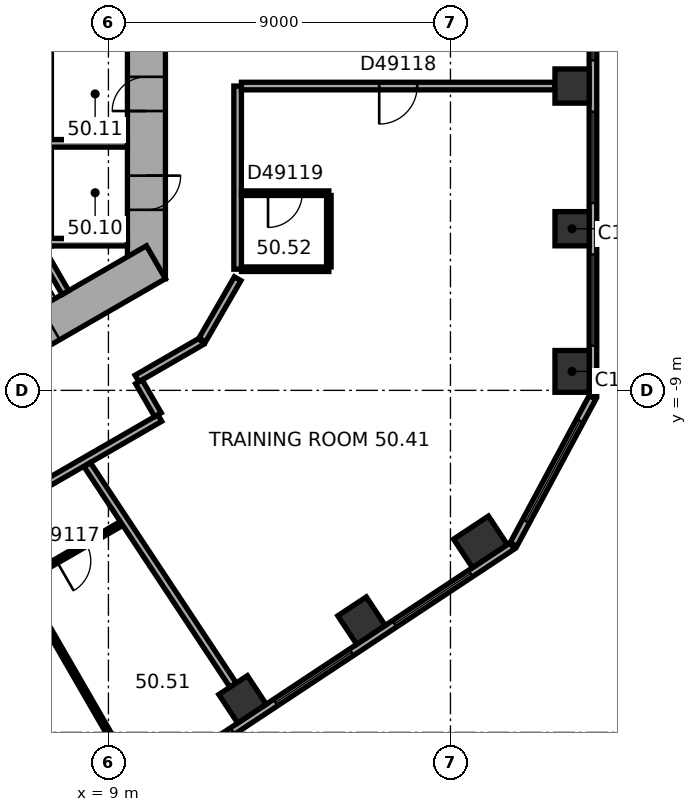
"""IFC4 building model, lengths in metres.
Left out: names, types, materials, properties, quantities, classifications, styles, units other than length and angle.
Written with IfcOpenShell. Run it as: python <this file> out.ifc"""

import sys

from ifc_helpers import new_model, si_unit, direction, frame, frame_2d, origin, origin_2d, place, context, subcontext, project, spatial, rectangle, extrude, element, fill, save


model = new_model("IFC4")
c1 = context("Model", 3, precision=1e-05, world=origin(), true_north=direction((0.0, 1.0)))
c2 = subcontext(c1, "Body", "Model", "MODEL_VIEW")
j1 = project(units=[si_unit("LENGTHUNIT", "METRE"), si_unit("PLANEANGLEUNIT", "RADIAN")], contexts=[c1])
p1 = place(None, origin())
s1 = spatial("IfcSite", under=j1, at=p1, CompositionType="ELEMENT")
p2 = place(p1, origin())
s2 = spatial("IfcBuilding", under=s1, at=p2, CompositionType="ELEMENT")
p3 = place(p2, frame((0.0, 0.0, 202.1)))
s3 = spatial("IfcBuildingStorey", under=s2, at=p3, CompositionType="ELEMENT", Elevation=202.1)
p4 = place(p3, frame((21.2, -8.501, 0.0), z_axis=(0.0, 0.0, 1.0), x_axis=(0.0, 1.0, 0.0)))
e1 = element("IfcColumn", 1, at=p4, inside=s3, PredefinedType="COLUMN", context=c2, shape_type="SweptSolid", body=[
    extrude(rectangle(XDim=1.1, YDim=0.9, at=origin_2d()), origin(), (0.0, 0.0, 1.0), 3.7),
])
for number, where, z_axis, x_axis in (
    (2, (21.2, -4.747, 0.0), (0.0, 0.0, 1.0), (0.0, 1.0, 0.0)),
    (3, (21.2, -0.993, 0.0), (0.0, 0.0, 1.0), (0.0, 1.0, 0.0)),
    (4, (12.529, -17.13, 0.0), (0.0, 0.0, 1.0), (0.834, 0.552, 0.0)),
    (5, (15.659, -15.058, 0.0), (0.0, 0.0, 1.0), (0.834, 0.552, 0.0)),
):
    element("IfcColumn", number, at=place(p3, frame(where, z_axis=z_axis, x_axis=x_axis)), inside=s3, PredefinedType="COLUMN", context=c2, shape_type="SweptSolid", body=[
        extrude(rectangle(XDim=0.9, YDim=0.9, at=origin_2d()), origin(), (0.0, 0.0, 1.0), 3.7),
    ])
p5 = place(p3, frame((18.79, -12.986, 0.0), z_axis=(0.0, 0.0, 1.0), x_axis=(0.833885822067, 0.551936985312, 0.0)))
e6 = element("IfcColumn", 6, at=p5, inside=s3, PredefinedType="COLUMN", context=c2, shape_type="SweptSolid", body=[
    extrude(rectangle(XDim=1.1, YDim=0.9, at=origin_2d()), origin(), (0.0, 0.0, 1.0), 3.7),
])
p6 = place(p3, frame((10.0, -6.062, 0.0), z_axis=(0.0, 0.0, 1.0), x_axis=(0.0, 1.0, 0.0)))
e7 = element("IfcWall", 7, at=p6, inside=s3, PredefinedType="SHEAR", context=c2, shape_type="SweptSolid", body=[
    extrude(rectangle(XDim=12.125, YDim=1.0, at=frame_2d((6.062, 0.0))), origin(), (0.0, 0.0, 1.0), 3.7),
])
p7 = place(p6, frame((6.262, 0.0, 0.0)))
e8 = element("IfcOpeningElement", 8, at=p7, cuts=e7, PredefinedType="OPENING", context=c2, shape_type="SweptSolid", body=[
    extrude(rectangle(XDim=1.5, YDim=2.1, at=frame_2d((0.75, 1.05))), frame((0.0, 0.51, 0.0), z_axis=(0.0, -1.0, 0.0), x_axis=(1.0, 0.0, 0.0)), (0.0, 0.0, 1.0), 1.02),
])
p8 = place(p6, frame((1.812, 0.0, 0.0)))
e9 = element("IfcOpeningElement", 9, at=p8, cuts=e7, PredefinedType="OPENING", context=c2, shape_type="SweptSolid", body=[
    extrude(rectangle(XDim=0.9, YDim=2.1, at=frame_2d((0.45, 1.05))), frame((0.0, 0.51, 0.0), z_axis=(0.0, -1.0, 0.0), x_axis=(1.0, 0.0, 0.0)), (0.0, 0.0, 1.0), 1.02),
])
p9 = place(p6, frame((4.412, 0.0, 0.0)))
e10 = element("IfcOpeningElement", 10, at=p9, cuts=e7, PredefinedType="OPENING", context=c2, shape_type="SweptSolid", body=[
    extrude(rectangle(XDim=0.9, YDim=2.1, at=frame_2d((0.45, 1.05))), frame((0.0, 0.51, 0.0), z_axis=(0.0, -1.0, 0.0), x_axis=(1.0, 0.0, 0.0)), (0.0, 0.0, 1.0), 1.02),
])
p10 = place(p3, frame((-0.25, -11.691, 0.0), z_axis=(0.0, 0.0, 1.0), x_axis=(0.866022616891, 0.50000482701, 0.0)))
e11 = element("IfcWall", 11, at=p10, inside=s3, PredefinedType="SHEAR", context=c2, shape_type="SweptSolid", body=[
    extrude(rectangle(XDim=12.125, YDim=1.0, at=frame_2d((6.062, 0.0))), origin(), (0.0, 0.0, 1.0), 3.7),
])
p11 = place(p10, frame((2.612, 0.0, 0.0)))
e12 = element("IfcOpeningElement", 12, at=p11, cuts=e11, PredefinedType="OPENING", context=c2, shape_type="SweptSolid", body=[
    extrude(rectangle(XDim=1.1, YDim=2.1, at=frame_2d((0.55, 1.05))), frame((0.0, 0.51, 0.0), z_axis=(0.0, -1.0, 0.0), x_axis=(1.0, 0.0, 0.0)), (0.0, 0.0, 1.0), 1.02),
])
p12 = place(p10, frame((5.212, 0.0, 0.0)))
e13 = element("IfcOpeningElement", 13, at=p12, cuts=e11, PredefinedType="OPENING", context=c2, shape_type="SweptSolid", body=[
    extrude(rectangle(XDim=1.1, YDim=2.1, at=frame_2d((0.55, 1.05))), frame((0.0, 0.51, 0.0), z_axis=(0.0, -1.0, 0.0), x_axis=(1.0, 0.0, 0.0)), (0.0, 0.0, 1.0), 1.02),
])
p13 = place(p10, frame((7.812, 0.0, 0.0)))
e14 = element("IfcOpeningElement", 14, at=p13, cuts=e11, PredefinedType="OPENING", context=c2, shape_type="SweptSolid", body=[
    extrude(rectangle(XDim=1.1, YDim=2.1, at=frame_2d((0.55, 1.05))), frame((0.0, 0.51, 0.0), z_axis=(0.0, -1.0, 0.0), x_axis=(1.0, 0.0, 0.0)), (0.0, 0.0, 1.0), 1.02),
])
p14 = place(p3, frame((21.75, -9.138, 0.0), z_axis=(0.0, 0.0, 1.0), x_axis=(0.0, 1.0, 0.0)))
e15 = element("IfcWall", 15, at=p14, inside=s3, PredefinedType="STANDARD", context=c2, shape_type="SweptSolid", body=[
    extrude(rectangle(XDim=20.044, YDim=0.2, at=frame_2d((10.022, 0.0))), origin(), (0.0, 0.0, 1.0), 3.7),
])
p15 = place(p14, frame((1.314, 0.0, 0.9)))
e16 = element("IfcOpeningElement", 16, at=p15, cuts=e15, PredefinedType="OPENING", context=c2, shape_type="SweptSolid", body=[
    extrude(rectangle(XDim=2.4, YDim=2.0, at=frame_2d((1.2, 1.0))), frame((0.0, 0.11, 0.0), z_axis=(0.0, -1.0, 0.0), x_axis=(1.0, 0.0, 0.0)), (0.0, 0.0, 1.0), 0.22),
])
p16 = place(p14, frame((5.069, 0.0, 0.9)))
e17 = element("IfcOpeningElement", 17, at=p16, cuts=e15, PredefinedType="OPENING", context=c2, shape_type="SweptSolid", body=[
    extrude(rectangle(XDim=2.4, YDim=2.0, at=frame_2d((1.2, 1.0))), frame((0.0, 0.11, 0.0), z_axis=(0.0, -1.0, 0.0), x_axis=(1.0, 0.0, 0.0)), (0.0, 0.0, 1.0), 0.22),
])
p17 = place(p14, frame((8.823, 0.0, 0.9)))
e18 = element("IfcOpeningElement", 18, at=p17, cuts=e15, PredefinedType="OPENING", context=c2, shape_type="SweptSolid", body=[
    extrude(rectangle(XDim=2.4, YDim=2.0, at=frame_2d((1.2, 1.0))), frame((0.0, 0.11, 0.0), z_axis=(0.0, -1.0, 0.0), x_axis=(1.0, 0.0, 0.0)), (0.0, 0.0, 1.0), 0.22),
])
p18 = place(p14, frame((12.577, 0.0, 0.9)))
e19 = element("IfcOpeningElement", 19, at=p18, cuts=e15, PredefinedType="OPENING", context=c2, shape_type="SweptSolid", body=[
    extrude(rectangle(XDim=2.4, YDim=2.0, at=frame_2d((1.2, 1.0))), frame((0.0, 0.11, 0.0), z_axis=(0.0, -1.0, 0.0), x_axis=(1.0, 0.0, 0.0)), (0.0, 0.0, 1.0), 0.22),
])
p19 = place(p14, frame((16.331, 0.0, 0.9)))
e20 = element("IfcOpeningElement", 20, at=p19, cuts=e15, PredefinedType="OPENING", context=c2, shape_type="SweptSolid", body=[
    extrude(rectangle(XDim=2.4, YDim=2.0, at=frame_2d((1.2, 1.0))), frame((0.0, 0.11, 0.0), z_axis=(0.0, -1.0, 0.0), x_axis=(1.0, 0.0, 0.0)), (0.0, 0.0, 1.0), 0.22),
])
p20 = place(p3, frame((2.911, -24.156, 0.0), z_axis=(0.0, 0.0, 1.0), x_axis=(0.833882163564, 0.551942512668, 0.0)))
e21 = element("IfcWall", 21, at=p20, inside=s3, PredefinedType="STANDARD", context=c2, shape_type="SweptSolid", body=[
    extrude(rectangle(XDim=20.044, YDim=0.2, at=frame_2d((10.022, 0.0))), origin(), (0.0, 0.0, 1.0), 3.7),
])
p21 = place(p20, frame((1.313, 0.0, 0.9)))
e22 = element("IfcOpeningElement", 22, at=p21, cuts=e21, PredefinedType="OPENING", context=c2, shape_type="SweptSolid", body=[
    extrude(rectangle(XDim=2.4, YDim=2.0, at=frame_2d((1.2, 1.0))), frame((0.0, 0.11, 0.0), z_axis=(0.0, -1.0, 0.0), x_axis=(1.0, 0.0, 0.0)), (0.0, 0.0, 1.0), 0.22),
])
p22 = place(p20, frame((5.067, 0.0, 0.9)))
e23 = element("IfcOpeningElement", 23, at=p22, cuts=e21, PredefinedType="OPENING", context=c2, shape_type="SweptSolid", body=[
    extrude(rectangle(XDim=2.4, YDim=2.0, at=frame_2d((1.2, 1.0))), frame((0.0, 0.11, 0.0), z_axis=(0.0, -1.0, 0.0), x_axis=(1.0, 0.0, 0.0)), (0.0, 0.0, 1.0), 0.22),
])
p23 = place(p20, frame((8.821, 0.0, 0.9)))
e24 = element("IfcOpeningElement", 24, at=p23, cuts=e21, PredefinedType="OPENING", context=c2, shape_type="SweptSolid", body=[
    extrude(rectangle(XDim=2.4, YDim=2.0, at=frame_2d((1.2, 1.0))), frame((0.0, 0.11, 0.0), z_axis=(0.0, -1.0, 0.0), x_axis=(1.0, 0.0, 0.0)), (0.0, 0.0, 1.0), 0.22),
])
p24 = place(p20, frame((12.575, 0.0, 0.9)))
e25 = element("IfcOpeningElement", 25, at=p24, cuts=e21, PredefinedType="OPENING", context=c2, shape_type="SweptSolid", body=[
    extrude(rectangle(XDim=2.4, YDim=2.0, at=frame_2d((1.2, 1.0))), frame((0.0, 0.11, 0.0), z_axis=(0.0, -1.0, 0.0), x_axis=(1.0, 0.0, 0.0)), (0.0, 0.0, 1.0), 0.22),
])
p25 = place(p20, frame((16.329, 0.0, 0.9)))
e26 = element("IfcOpeningElement", 26, at=p25, cuts=e21, PredefinedType="OPENING", context=c2, shape_type="SweptSolid", body=[
    extrude(rectangle(XDim=2.4, YDim=2.0, at=frame_2d((1.2, 1.0))), frame((0.0, 0.11, 0.0), z_axis=(0.0, -1.0, 0.0), x_axis=(1.0, 0.0, 0.0)), (0.0, 0.0, 1.0), 0.22),
])
p26 = place(p3, frame((19.658, -13.057, 0.0), z_axis=(0.0, 0.0, 1.0), x_axis=(0.473307879841, 0.880897071672, 0.0)))
e27 = element("IfcWall", 27, at=p26, inside=s3, PredefinedType="STANDARD", context=c2, shape_type="SweptSolid", body=[
    extrude(rectangle(XDim=4.395, YDim=0.2, at=frame_2d((2.197, 0.0))), origin(), (0.0, 0.0, 1.0), 3.7),
])
p27 = place(p26, frame((0.698, 0.0, 0.9)))
e28 = element("IfcOpeningElement", 28, at=p27, cuts=e27, PredefinedType="OPENING", context=c2, shape_type="SweptSolid", body=[
    extrude(rectangle(XDim=3.0, YDim=2.0, at=frame_2d((1.5, 1.0))), frame((0.0, 0.11, 0.0), z_axis=(0.0, -1.0, 0.0), x_axis=(1.0, 0.0, 0.0)), (0.0, 0.0, 1.0), 0.22),
])
for number, where, z_axis, x_axis in (
    (29, (7.3, -5.1, 0.0), (0.0, 0.0, 1.0), (1.0, 0.0, 0.0)),
    (30, (7.3, -2.5, 0.0), (0.0, 0.0, 1.0), (1.0, 0.0, 0.0)),
    (31, (6.768, -4.522, 0.0), (0.0, 0.0, 1.0), (0.5, -0.866, 0.0)),
):
    element("IfcWall", number, at=place(p3, frame(where, z_axis=z_axis, x_axis=x_axis)), inside=s3, PredefinedType="PARTITIONING", context=c2, shape_type="SweptSolid", body=[
        extrude(rectangle(XDim=2.2, YDim=0.2, at=frame_2d((1.1, 0.0))), origin(), (0.0, 0.0, 1.0), 3.35),
    ])
p28 = place(p3, frame((2.816, -14.079, 0.0), z_axis=(0.0, 0.0, 1.0), x_axis=(0.866021128829, 0.500007404367, 0.0)))
e32 = element("IfcWall", 32, at=p28, inside=s3, PredefinedType="PARTITIONING", context=c2, shape_type="SweptSolid", body=[
    extrude(rectangle(XDim=8.702, YDim=0.2, at=frame_2d((4.351, 0.0))), origin(), (0.0, 0.0, 1.0), 3.35),
])
p29 = place(p28, frame((2.714, 0.0, 0.0)))
e33 = element("IfcOpeningElement", 33, at=p29, cuts=e32, PredefinedType="OPENING", context=c2, shape_type="SweptSolid", body=[
    extrude(rectangle(XDim=1.0, YDim=2.1, at=frame_2d((0.5, 1.05))), frame((0.0, 0.11, 0.0), z_axis=(0.0, -1.0, 0.0), x_axis=(1.0, 0.0, 0.0)), (0.0, 0.0, 1.0), 0.22),
])
p30 = place(p3, frame((3.005, -16.164, 0.0), z_axis=(0.0, 0.0, 1.0), x_axis=(0.866018452427, 0.500012039911, 0.0)))
e34 = element("IfcWall", 34, at=p30, inside=s3, PredefinedType="PARTITIONING", context=c2, shape_type="SweptSolid", body=[
    extrude(rectangle(XDim=7.322, YDim=0.12, at=frame_2d((3.661, 0.0))), origin(), (0.0, 0.0, 1.0), 3.35),
])
p31 = place(p30, frame((0.55, 0.0, 0.0)))
e35 = element("IfcOpeningElement", 35, at=p31, cuts=e34, PredefinedType="OPENING", context=c2, shape_type="SweptSolid", body=[
    extrude(rectangle(XDim=1.0, YDim=2.1, at=frame_2d((0.5, 1.05))), frame((0.0, 0.07, 0.0), z_axis=(0.0, -1.0, 0.0), x_axis=(1.0, 0.0, 0.0)), (0.0, 0.0, 1.0), 0.14),
])
p32 = place(p30, frame((2.736, 0.0, 0.0)))
e36 = element("IfcOpeningElement", 36, at=p32, cuts=e34, PredefinedType="OPENING", context=c2, shape_type="SweptSolid", body=[
    extrude(rectangle(XDim=0.9, YDim=2.1, at=frame_2d((0.45, 1.05))), frame((0.0, 0.07, 0.0), z_axis=(0.0, -1.0, 0.0), x_axis=(1.0, 0.0, 0.0)), (0.0, 0.0, 1.0), 0.14),
])
p33 = place(p30, frame((5.347, 0.0, 0.0)))
e37 = element("IfcOpeningElement", 37, at=p33, cuts=e34, PredefinedType="OPENING", context=c2, shape_type="SweptSolid", body=[
    extrude(rectangle(XDim=0.9, YDim=2.1, at=frame_2d((0.45, 1.05))), frame((0.0, 0.07, 0.0), z_axis=(0.0, -1.0, 0.0), x_axis=(1.0, 0.0, 0.0)), (0.0, 0.0, 1.0), 0.14),
])
p34 = place(p3, frame((9.385, -18.672, 0.0), z_axis=(0.0, 0.0, 1.0), x_axis=(-0.500012117035, 0.866018407898, 0.0)))
e38 = element("IfcWall", 38, at=p34, inside=s3, PredefinedType="PARTITIONING", context=c2, shape_type="SweptSolid", body=[
    extrude(rectangle(XDim=5.302, YDim=0.12, at=frame_2d((2.651, 0.0))), origin(), (0.0, 0.0, 1.0), 2.55),
])
p35 = place(p3, frame((9.752, -8.688, 0.0), z_axis=(0.0, 0.0, 1.0), x_axis=(0.865974105138, 0.500088841337, 0.0)))
e39 = element("IfcWall", 39, at=p35, inside=s3, PredefinedType="PARTITIONING", context=c2, shape_type="SweptSolid", body=[
    extrude(rectangle(XDim=1.961, YDim=0.2, at=frame_2d((0.98, 0.0))), origin(), (0.0, 0.0, 1.0), 3.35),
])
p36 = place(p3, frame((10.302, -9.642, 0.0), z_axis=(0.0, 0.0, 1.0), x_axis=(-0.500074377092, 0.865982457891, 0.0)))
e40 = element("IfcWall", 40, at=p36, inside=s3, PredefinedType="PARTITIONING", context=c2, shape_type="SweptSolid", body=[
    extrude(rectangle(XDim=1.001, YDim=0.2, at=frame_2d((0.5, 0.0))), origin(), (0.0, 0.0, 1.0), 3.35),
])
p37 = place(p3, frame((11.47, -7.673, 0.0), z_axis=(0.0, 0.0, 1.0), x_axis=(0.499964847546, 0.866045698112, 0.0)))
e41 = element("IfcWall", 41, at=p37, inside=s3, PredefinedType="PARTITIONING", context=c2, shape_type="SweptSolid", body=[
    extrude(rectangle(XDim=1.86, YDim=0.2, at=frame_2d((0.93, 0.0))), origin(), (0.0, 0.0, 1.0), 3.35),
])
p38 = place(p3, frame((12.281, -16.755, 0.0), z_axis=(0.0, 0.0, 1.0), x_axis=(-0.551925794663, 0.833893228888, 0.0)))
e42 = element("IfcWall", 42, at=p38, inside=s3, PredefinedType="PARTITIONING", context=c2, shape_type="SweptSolid", body=[
    extrude(rectangle(XDim=6.953, YDim=0.2, at=frame_2d((3.476, 0.0))), origin(), (0.0, 0.0, 1.0), 3.35),
])
p39 = place(p3, frame((12.4, -5.812, 0.0), z_axis=(0.0, 0.0, 1.0), x_axis=(0.0, 1.0, 0.0)))
e43 = element("IfcWall", 43, at=p39, inside=s3, PredefinedType="PARTITIONING", context=c2, shape_type="SweptSolid", body=[
    extrude(rectangle(XDim=4.819, YDim=0.2, at=frame_2d((2.41, 0.0))), origin(), (0.0, 0.0, 1.0), 3.35),
])
p40 = place(p3, frame((12.5, -3.812, 0.0), z_axis=(0.0, 0.0, 1.0), x_axis=(1.0, 0.0, 0.0)))
e44 = element("IfcWall", 44, at=p40, inside=s3, PredefinedType="PARTITIONING", context=c2, shape_type="SweptSolid", body=[
    extrude(rectangle(XDim=2.3, YDim=0.12, at=frame_2d((1.15, 0.0))), origin(), (0.0, 0.0, 1.0), 3.35),
])
p41 = place(p40, frame((0.7, 0.0, 0.0)))
e45 = element("IfcOpeningElement", 45, at=p41, cuts=e44, PredefinedType="OPENING", context=c2, shape_type="SweptSolid", body=[
    extrude(rectangle(XDim=0.9, YDim=2.1, at=frame_2d((0.45, 1.05))), frame((0.0, 0.07, 0.0), z_axis=(0.0, -1.0, 0.0), x_axis=(1.0, 0.0, 0.0)), (0.0, 0.0, 1.0), 0.14),
])
p42 = place(p3, frame((12.5, -0.993, 0.0), z_axis=(0.0, 0.0, 1.0), x_axis=(1.0, 0.0, 0.0)))
e46 = element("IfcWall", 46, at=p42, inside=s3, PredefinedType="PARTITIONING", context=c2, shape_type="SweptSolid", body=[
    extrude(rectangle(XDim=8.25, YDim=0.2, at=frame_2d((4.125, 0.0))), origin(), (0.0, 0.0, 1.0), 2.55),
])
p43 = place(p42, frame((3.625, 0.0, 0.0)))
e47 = element("IfcOpeningElement", 47, at=p43, cuts=e46, PredefinedType="OPENING", context=c2, shape_type="SweptSolid", body=[
    extrude(rectangle(XDim=1.0, YDim=2.1, at=frame_2d((0.5, 1.05))), frame((0.0, 0.11, 0.0), z_axis=(0.0, -1.0, 0.0), x_axis=(1.0, 0.0, 0.0)), (0.0, 0.0, 1.0), 0.22),
])
p44 = place(p3, frame((14.8, -5.812, 0.0), z_axis=(0.0, 0.0, 1.0), x_axis=(-1.0, 0.0, 0.0)))
e48 = element("IfcWall", 48, at=p44, inside=s3, PredefinedType="PARTITIONING", context=c2, shape_type="SweptSolid", body=[
    extrude(rectangle(XDim=2.3, YDim=0.12, at=frame_2d((1.15, 0.0))), origin(), (0.0, 0.0, 1.0), 3.35),
])
p45 = place(p3, frame((14.8, -3.872, 0.0), z_axis=(0.0, 0.0, 1.0), x_axis=(0.0, -1.0, 0.0)))
e49 = element("IfcWall", 49, at=p45, inside=s3, PredefinedType="PARTITIONING", context=c2, shape_type="SweptSolid", body=[
    extrude(rectangle(XDim=1.88, YDim=0.12, at=frame_2d((0.94, 0.0))), origin(), (0.0, 0.0, 1.0), 3.35),
])
p46 = place(p15, origin())
e50 = element("IfcWindow", 50, at=p46, inside=s3, PartitioningType="SINGLE_PANEL", PredefinedType="WINDOW", context=c2, shape_type="SweptSolid", body=[
    extrude(rectangle(XDim=2.4, YDim=2.0, at=frame_2d((1.2, 1.0))), frame((0.0, 0.03, 0.0), z_axis=(0.0, -1.0, 0.0), x_axis=(1.0, 0.0, 0.0)), (0.0, 0.0, 1.0), 0.06),
])
fill(e16, e50)
p47 = place(p16, origin())
e51 = element("IfcWindow", 51, at=p47, inside=s3, PartitioningType="SINGLE_PANEL", PredefinedType="WINDOW", context=c2, shape_type="SweptSolid", body=[
    extrude(rectangle(XDim=2.4, YDim=2.0, at=frame_2d((1.2, 1.0))), frame((0.0, 0.03, 0.0), z_axis=(0.0, -1.0, 0.0), x_axis=(1.0, 0.0, 0.0)), (0.0, 0.0, 1.0), 0.06),
])
fill(e17, e51)
p48 = place(p17, origin())
e52 = element("IfcWindow", 52, at=p48, inside=s3, PartitioningType="SINGLE_PANEL", PredefinedType="WINDOW", context=c2, shape_type="SweptSolid", body=[
    extrude(rectangle(XDim=2.4, YDim=2.0, at=frame_2d((1.2, 1.0))), frame((0.0, 0.03, 0.0), z_axis=(0.0, -1.0, 0.0), x_axis=(1.0, 0.0, 0.0)), (0.0, 0.0, 1.0), 0.06),
])
fill(e18, e52)
p49 = place(p23, origin())
e53 = element("IfcWindow", 53, at=p49, inside=s3, PartitioningType="SINGLE_PANEL", PredefinedType="WINDOW", context=c2, shape_type="SweptSolid", body=[
    extrude(rectangle(XDim=2.4, YDim=2.0, at=frame_2d((1.2, 1.0))), frame((0.0, 0.03, 0.0), z_axis=(0.0, -1.0, 0.0), x_axis=(1.0, 0.0, 0.0)), (0.0, 0.0, 1.0), 0.06),
])
fill(e24, e53)
p50 = place(p24, origin())
e54 = element("IfcWindow", 54, at=p50, inside=s3, PartitioningType="SINGLE_PANEL", PredefinedType="WINDOW", context=c2, shape_type="SweptSolid", body=[
    extrude(rectangle(XDim=2.4, YDim=2.0, at=frame_2d((1.2, 1.0))), frame((0.0, 0.03, 0.0), z_axis=(0.0, -1.0, 0.0), x_axis=(1.0, 0.0, 0.0)), (0.0, 0.0, 1.0), 0.06),
])
fill(e25, e54)
p51 = place(p25, origin())
e55 = element("IfcWindow", 55, at=p51, inside=s3, PartitioningType="SINGLE_PANEL", PredefinedType="WINDOW", context=c2, shape_type="SweptSolid", body=[
    extrude(rectangle(XDim=2.4, YDim=2.0, at=frame_2d((1.2, 1.0))), frame((0.0, 0.03, 0.0), z_axis=(0.0, -1.0, 0.0), x_axis=(1.0, 0.0, 0.0)), (0.0, 0.0, 1.0), 0.06),
])
fill(e26, e55)
p52 = place(p27, origin())
e56 = element("IfcWindow", 56, at=p52, inside=s3, PartitioningType="SINGLE_PANEL", PredefinedType="WINDOW", context=c2, shape_type="SweptSolid", body=[
    extrude(rectangle(XDim=3.0, YDim=2.0, at=frame_2d((1.5, 1.0))), frame((0.0, 0.03, 0.0), z_axis=(0.0, -1.0, 0.0), x_axis=(1.0, 0.0, 0.0)), (0.0, 0.0, 1.0), 0.06),
])
fill(e28, e56)
p53 = place(p8, origin())
e57 = element("IfcDoor", 57, at=p53, inside=s3, OperationType="SINGLE_SWING_LEFT", PredefinedType="DOOR", context=c2, shape_type="SweptSolid", body=[
    extrude(rectangle(XDim=0.9, YDim=2.1, at=frame_2d((0.45, 1.05))), frame((0.0, 0.025, 0.0), z_axis=(0.0, -1.0, 0.0), x_axis=(1.0, 0.0, 0.0)), (0.0, 0.0, 1.0), 0.05),
])
fill(e9, e57)
p54 = place(p9, origin())
e58 = element("IfcDoor", 58, at=p54, inside=s3, OperationType="SINGLE_SWING_LEFT", PredefinedType="DOOR", context=c2, shape_type="SweptSolid", body=[
    extrude(rectangle(XDim=0.9, YDim=2.1, at=frame_2d((0.45, 1.05))), frame((0.0, 0.025, 0.0), z_axis=(0.0, -1.0, 0.0), x_axis=(1.0, 0.0, 0.0)), (0.0, 0.0, 1.0), 0.05),
])
fill(e10, e58)
p55 = place(p33, origin())
e59 = element("IfcDoor", 59, at=p55, inside=s3, OperationType="SINGLE_SWING_LEFT", PredefinedType="DOOR", context=c2, shape_type="SweptSolid", body=[
    extrude(rectangle(XDim=0.9, YDim=2.1, at=frame_2d((0.45, 1.05))), frame((0.0, 0.025, 0.0), z_axis=(0.0, -1.0, 0.0), x_axis=(1.0, 0.0, 0.0)), (0.0, 0.0, 1.0), 0.05),
])
fill(e37, e59)
p56 = place(p43, origin())
e60 = element("IfcDoor", 60, at=p56, inside=s3, OperationType="SINGLE_SWING_LEFT", PredefinedType="DOOR", context=c2, shape_type="SweptSolid", body=[
    extrude(rectangle(XDim=1.0, YDim=2.1, at=frame_2d((0.5, 1.05))), frame((0.0, 0.025, 0.0), z_axis=(0.0, -1.0, 0.0), x_axis=(1.0, 0.0, 0.0)), (0.0, 0.0, 1.0), 0.05),
])
fill(e47, e60)
p57 = place(p41, origin())
e61 = element("IfcDoor", 61, at=p57, inside=s3, OperationType="SINGLE_SWING_LEFT", PredefinedType="DOOR", context=c2, shape_type="SweptSolid", body=[
    extrude(rectangle(XDim=0.9, YDim=2.1, at=frame_2d((0.45, 1.05))), frame((0.0, 0.025, 0.0), z_axis=(0.0, -1.0, 0.0), x_axis=(1.0, 0.0, 0.0)), (0.0, 0.0, 1.0), 0.05),
])
fill(e45, e61)
save(model, sys.argv[1])
